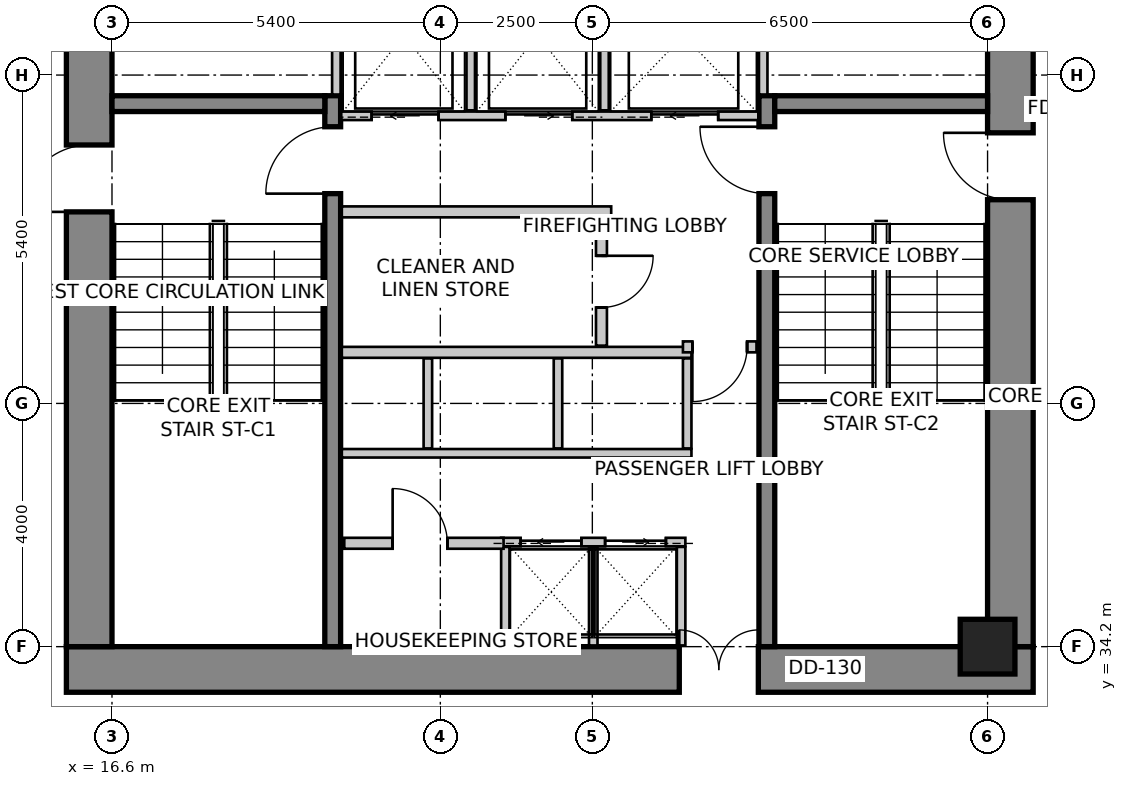
"""IFC4 building model, lengths in metres.
Left out: names, types, materials, properties, quantities, classifications, styles, units other than length and angle.
Written with IfcOpenShell. Run it as: python <this file> out.ifc"""

import sys

from ifc_helpers import new_model, si_unit, direction, frame, frame_2d, origin, origin_2d, place, context, subcontext, project, spatial, rectangle, extrude, source, transform, mapped, element, fill, save


model = new_model("IFC4")
c1 = context("Model", 3, precision=1e-05, world=origin(), true_north=direction((0.0, 1.0)))
c2 = subcontext(c1, "Body", "Model", "MODEL_VIEW")
j1 = project(units=[si_unit("LENGTHUNIT", "METRE"), si_unit("PLANEANGLEUNIT", "RADIAN")], contexts=[c1])
p1 = place(None, origin())
s1 = spatial("IfcSite", under=j1, at=p1, CompositionType="ELEMENT")
p2 = place(p1, origin())
s2 = spatial("IfcBuilding", under=s1, at=p2, CompositionType="ELEMENT")
p3 = place(p2, frame((0.0, 0.0, 132.2)))
s3 = spatial("IfcBuildingStorey", under=s2, at=p3, CompositionType="ELEMENT", Elevation=132.2)
p4 = place(p3, frame((15.85, 33.825, 0.0), z_axis=(0.0, 0.0, 1.0), x_axis=(1.0, 0.0, 0.0)))
e1 = element("IfcWall", 1, at=p4, inside=s3, PredefinedType="SHEAR", context=c2, shape_type="SweptSolid", body=[
    extrude(rectangle(XDim=15.9, YDim=0.75, at=frame_2d((7.95, 0.0))), origin(), (0.0, 0.0, 1.0), 3.6),
])
m1 = source(origin(), c2, "Body", "SweptSolid", [
    extrude(rectangle(XDim=1.3, YDim=2.15, at=frame_2d((0.65, 1.075))), frame((0.0, 0.385, 0.0), z_axis=(0.0, -1.0, 0.0), x_axis=(1.0, 0.0, 0.0)), (0.0, 0.0, 1.0), 0.77),
])
p5 = place(p4, frame((10.08, 0.0, 0.0)))
e2 = element("IfcOpeningElement", 2, at=p5, cuts=e1, PredefinedType="OPENING", context=c2, shape_type="MappedRepresentation", body=[
    mapped(m1, transform((0.0, 0.0, 0.0), scale=1.0)),
])
p6 = place(p3, frame((16.225, 34.2, 0.0), z_axis=(0.0, 0.0, 1.0), x_axis=(0.0, 1.0, 0.0)))
e3 = element("IfcWall", 3, at=p6, inside=s3, PredefinedType="SHEAR", context=c2, shape_type="SweptSolid", body=[
    extrude(rectangle(XDim=11.4, YDim=0.75, at=frame_2d((5.7, 0.0))), origin(), (0.0, 0.0, 1.0), 3.6),
])
m2 = source(origin(), c2, "Body", "SweptSolid", [
    extrude(rectangle(XDim=1.1, YDim=2.15, at=frame_2d((0.55, 1.075))), frame((0.0, 0.385, 0.0), z_axis=(0.0, -1.0, 0.0), x_axis=(1.0, 0.0, 0.0)), (0.0, 0.0, 1.0), 0.77),
])
p7 = place(p6, frame((7.15, 0.0, 0.0)))
e4 = element("IfcOpeningElement", 4, at=p7, cuts=e3, PredefinedType="OPENING", context=c2, shape_type="MappedRepresentation", body=[
    mapped(m2, transform((0.0, 0.0, 0.0), scale=1.0)),
])
p8 = place(p3, frame((31.375, 34.2, 0.0), z_axis=(0.0, 0.0, 1.0), x_axis=(0.0, 1.0, 0.0)))
e5 = element("IfcWall", 5, at=p8, inside=s3, PredefinedType="SHEAR", context=c2, shape_type="SweptSolid", body=[
    extrude(rectangle(XDim=11.4, YDim=0.75, at=frame_2d((5.7, 0.0))), origin(), (0.0, 0.0, 1.0), 3.6),
])
p9 = place(p8, frame((7.35, 0.0, 0.0)))
e6 = element("IfcOpeningElement", 6, at=p9, cuts=e5, PredefinedType="OPENING", context=c2, shape_type="MappedRepresentation", body=[
    mapped(m2, transform((0.0, 0.0, 0.0), scale=1.0)),
])
p10 = place(p3, frame((20.23, 34.2, 0.0), z_axis=(0.0, 0.0, 1.0), x_axis=(0.0, 1.0, 0.0)))
e7 = element("IfcWall", 7, at=p10, inside=s3, PredefinedType="SHEAR", context=c2, shape_type="SweptSolid", body=[
    extrude(rectangle(XDim=9.06, YDim=0.26, at=frame_2d((4.53, 0.0))), origin(), (0.0, 0.0, 1.0), 3.6),
])
m3 = source(origin(), c2, "Body", "SweptSolid", [
    extrude(rectangle(XDim=1.1, YDim=2.15, at=frame_2d((0.55, 1.075))), frame((0.0, 0.14, 0.0), z_axis=(0.0, -1.0, 0.0), x_axis=(1.0, 0.0, 0.0)), (0.0, 0.0, 1.0), 0.28),
])
p11 = place(p10, frame((7.45, 0.0, 0.0)))
e8 = element("IfcOpeningElement", 8, at=p11, cuts=e7, PredefinedType="OPENING", context=c2, shape_type="MappedRepresentation", body=[
    mapped(m3, transform((0.0, 0.0, 0.0), scale=1.0)),
])
p12 = place(p3, frame((27.37, 34.2, 0.0), z_axis=(0.0, 0.0, 1.0), x_axis=(0.0, 1.0, 0.0)))
e9 = element("IfcWall", 9, at=p12, inside=s3, PredefinedType="SHEAR", context=c2, shape_type="SweptSolid", body=[
    extrude(rectangle(XDim=9.06, YDim=0.26, at=frame_2d((4.53, 0.0))), origin(), (0.0, 0.0, 1.0), 3.6),
])
p13 = place(p12, frame((7.45, 0.0, 0.0)))
e10 = element("IfcOpeningElement", 10, at=p13, cuts=e9, PredefinedType="OPENING", context=c2, shape_type="MappedRepresentation", body=[
    mapped(m3, transform((0.0, 0.0, 0.0), scale=1.0)),
])
for number, where, z_axis, x_axis in (
    (11, (16.6, 43.13, 0.0), (0.0, 0.0, 1.0), (1.0, 0.0, 0.0)),
    (12, (27.5, 43.13, 0.0), (0.0, 0.0, 1.0), (1.0, 0.0, 0.0)),
):
    element("IfcWall", number, at=place(p3, frame(where, z_axis=z_axis, x_axis=x_axis)), inside=s3, PredefinedType="SHEAR", context=c2, shape_type="SweptSolid", body=[
        extrude(rectangle(XDim=3.5, YDim=0.26, at=frame_2d((1.75, 0.0))), origin(), (0.0, 0.0, 1.0), 3.6),
    ])
m4 = source(origin(), c2, "Body", "SweptSolid", [
    extrude(rectangle(XDim=0.9, YDim=0.9, at=origin_2d()), origin(), (0.0, 0.0, 1.0), 3.6),
])
p14 = place(p3, frame((31.0, 34.2, 0.0), z_axis=(0.0, 0.0, 1.0), x_axis=(1.0, 0.0, 0.0)))
e13 = element("IfcColumn", 13, at=p14, inside=s3, PredefinedType="COLUMN", context=c2, shape_type="MappedRepresentation", body=[
    mapped(m4, transform((0.0, 0.0, 0.0), scale=1.0)),
])
p15 = place(p3, frame((20.37, 42.93, 0.0), z_axis=(0.0, 0.0, 1.0), x_axis=(1.0, 0.0, 0.0)))
e14 = element("IfcWall", 14, at=p15, inside=s3, PredefinedType="SOLIDWALL", context=c2, shape_type="SweptSolid", body=[
    extrude(rectangle(XDim=6.86, YDim=0.14, at=frame_2d((3.43, 0.0))), origin(), (0.0, 0.0, 1.0), 3.35),
])
m5 = source(origin(), c2, "Body", "SweptSolid", [
    extrude(rectangle(XDim=1.1, YDim=2.15, at=frame_2d((0.55, 1.075))), frame((0.0, 0.08, 0.0), z_axis=(0.0, -1.0, 0.0), x_axis=(1.0, 0.0, 0.0)), (0.0, 0.0, 1.0), 0.16),
])
p16 = place(p15, frame((0.5, 0.0, 0.0)))
e15 = element("IfcOpeningElement", 15, at=p16, cuts=e14, PredefinedType="OPENING", context=c2, shape_type="MappedRepresentation", body=[
    mapped(m5, transform((0.0, 0.0, 0.0), scale=1.0)),
])
p17 = place(p15, frame((2.7, 0.0, 0.0)))
e16 = element("IfcOpeningElement", 16, at=p17, cuts=e14, PredefinedType="OPENING", context=c2, shape_type="MappedRepresentation", body=[
    mapped(m5, transform((0.0, 0.0, 0.0), scale=1.0)),
])
p18 = place(p15, frame((5.1, 0.0, 0.0)))
e17 = element("IfcOpeningElement", 17, at=p18, cuts=e14, PredefinedType="OPENING", context=c2, shape_type="MappedRepresentation", body=[
    mapped(m5, transform((0.0, 0.0, 0.0), scale=1.0)),
])
for number, where, z_axis, x_axis in (
    (18, (20.29, 43.28, 0.0), (0.0, 0.0, 1.0), (0.0, 1.0, 0.0)),
    (19, (27.31, 43.28, 0.0), (0.0, 0.0, 1.0), (0.0, 1.0, 0.0)),
):
    element("IfcWall", number, at=place(p3, frame(where, z_axis=z_axis, x_axis=x_axis)), inside=s3, PredefinedType="SOLIDWALL", context=c2, shape_type="SweptSolid", body=[
        extrude(rectangle(XDim=2.3, YDim=0.14, at=frame_2d((1.15, 0.0))), origin(), (0.0, 0.0, 1.0), 3.35),
    ])
for number, where, z_axis, x_axis in (
    (20, (22.5, 43.02, 0.0), (0.0, 0.0, 1.0), (0.0, 1.0, 0.0)),
    (21, (24.7, 43.02, 0.0), (0.0, 0.0, 1.0), (0.0, 1.0, 0.0)),
):
    element("IfcWall", number, at=place(p3, frame(where, z_axis=z_axis, x_axis=x_axis)), inside=s3, PredefinedType="SOLIDWALL", context=c2, shape_type="SweptSolid", body=[
        extrude(rectangle(XDim=2.56, YDim=0.14, at=frame_2d((1.28, 0.0))), origin(), (0.0, 0.0, 1.0), 3.35),
    ])
p19 = place(p3, frame((23.0, 35.92, 0.0), z_axis=(0.0, 0.0, 1.0), x_axis=(1.0, 0.0, 0.0)))
e22 = element("IfcWall", 22, at=p19, inside=s3, PredefinedType="SOLIDWALL", context=c2, shape_type="SweptSolid", body=[
    extrude(rectangle(XDim=3.03, YDim=0.14, at=frame_2d((1.515, 0.0))), origin(), (0.0, 0.0, 1.0), 3.35),
])
m6 = source(origin(), c2, "Body", "SweptSolid", [
    extrude(rectangle(XDim=1.0, YDim=2.15, at=frame_2d((0.5, 1.075))), frame((0.0, 0.08, 0.0), z_axis=(0.0, -1.0, 0.0), x_axis=(1.0, 0.0, 0.0)), (0.0, 0.0, 1.0), 0.16),
])
p20 = place(p19, frame((0.32, 0.0, 0.0)))
e23 = element("IfcOpeningElement", 23, at=p20, cuts=e22, PredefinedType="OPENING", context=c2, shape_type="MappedRepresentation", body=[
    mapped(m6, transform((0.0, 0.0, 0.0), scale=1.0)),
])
p21 = place(p19, frame((1.71, 0.0, 0.0)))
e24 = element("IfcOpeningElement", 24, at=p21, cuts=e22, PredefinedType="OPENING", context=c2, shape_type="MappedRepresentation", body=[
    mapped(m6, transform((0.0, 0.0, 0.0), scale=1.0)),
])
for number, where, z_axis, x_axis in (
    (25, (25.96, 34.22, 0.0), (0.0, 0.0, 1.0), (0.0, 1.0, 0.0)),
    (26, (23.07, 34.22, 0.0), (0.0, 0.0, 1.0), (0.0, 1.0, 0.0)),
    (27, (24.515, 34.22, 0.0), (0.0, 0.0, 1.0), (0.0, 1.0, 0.0)),
):
    element("IfcWall", number, at=place(p3, frame(where, z_axis=z_axis, x_axis=x_axis)), inside=s3, PredefinedType="SOLIDWALL", context=c2, shape_type="SweptSolid", body=[
        extrude(rectangle(XDim=1.62, YDim=0.14, at=frame_2d((0.81, 0.0))), origin(), (0.0, 0.0, 1.0), 2.642),
    ])
p22 = place(p3, frame((20.38, 37.38, 0.0), z_axis=(0.0, 0.0, 1.0), x_axis=(1.0, 0.0, 0.0)))
e28 = element("IfcWall", 28, at=p22, inside=s3, PredefinedType="SOLIDWALL", context=c2, shape_type="SweptSolid", body=[
    extrude(rectangle(XDim=5.75, YDim=0.14, at=frame_2d((2.875, 0.0))), origin(), (0.0, 0.0, 1.0), 3.35),
])
p23 = place(p3, frame((20.38, 39.04, 0.0), z_axis=(0.0, 0.0, 1.0), x_axis=(1.0, 0.0, 0.0)))
e29 = element("IfcWall", 29, at=p23, inside=s3, PredefinedType="SOLIDWALL", context=c2, shape_type="SweptSolid", body=[
    extrude(rectangle(XDim=5.75, YDim=0.18, at=frame_2d((2.875, 0.0))), origin(), (0.0, 0.0, 1.0), 3.35),
])
for number, where, z_axis, x_axis in (
    (30, (26.06, 37.46, 0.0), (0.0, 0.0, 1.0), (0.0, 1.0, 0.0)),
    (31, (21.795, 37.46, 0.0), (0.0, 0.0, 1.0), (0.0, 1.0, 0.0)),
    (32, (23.935, 37.46, 0.0), (0.0, 0.0, 1.0), (0.0, 1.0, 0.0)),
):
    element("IfcWall", number, at=place(p3, frame(where, z_axis=z_axis, x_axis=x_axis)), inside=s3, PredefinedType="SOLIDWALL", context=c2, shape_type="SweptSolid", body=[
        extrude(rectangle(XDim=1.48, YDim=0.14, at=frame_2d((0.74, 0.0))), origin(), (0.0, 0.0, 1.0), 3.35),
    ])
p24 = place(p3, frame((24.81, 41.35, 0.0), z_axis=(0.0, 0.0, 1.0), x_axis=(-1.0, 0.0, 0.0)))
e33 = element("IfcWall", 33, at=p24, inside=s3, PredefinedType="PARTITIONING", context=c2, shape_type="SweptSolid", body=[
    extrude(rectangle(XDim=4.43, YDim=0.18, at=frame_2d((2.215, 0.0))), origin(), (0.0, 0.0, 1.0), 3.35),
])
p25 = place(p3, frame((24.65, 41.256, 0.0), z_axis=(0.0, 0.0, 1.0), x_axis=(0.0, -1.0, 0.0)))
e34 = element("IfcWall", 34, at=p25, inside=s3, PredefinedType="PARTITIONING", context=c2, shape_type="SweptSolid", body=[
    extrude(rectangle(XDim=2.106, YDim=0.18, at=frame_2d((1.053, 0.0))), origin(), (0.0, 0.0, 1.0), 3.35),
])
m7 = source(origin(), c2, "Body", "SweptSolid", [
    extrude(rectangle(XDim=0.85, YDim=2.15, at=frame_2d((0.425, 1.075))), frame((0.0, 0.1, 0.0), z_axis=(0.0, -1.0, 0.0), x_axis=(1.0, 0.0, 0.0)), (0.0, 0.0, 1.0), 0.2),
])
p26 = place(p25, frame((0.628, 0.0, 0.0)))
e35 = element("IfcOpeningElement", 35, at=p26, cuts=e34, PredefinedType="OPENING", context=c2, shape_type="MappedRepresentation", body=[
    mapped(m7, transform((0.0, 0.0, 0.0), scale=1.0)),
])
p27 = place(p3, frame((27.2, 39.13, 0.0), z_axis=(0.0, 0.0, 1.0), x_axis=(-1.0, 0.0, 0.0)))
e36 = element("IfcWall", 36, at=p27, inside=s3, PredefinedType="PARTITIONING", context=c2, shape_type="SweptSolid", body=[
    extrude(rectangle(XDim=1.21, YDim=0.18, at=frame_2d((0.605, 0.0))), origin(), (0.0, 0.0, 1.0), 3.35),
])
m8 = source(origin(), c2, "Body", "SweptSolid", [
    extrude(rectangle(XDim=0.9, YDim=2.15, at=frame_2d((0.45, 1.075))), frame((0.0, 0.1, 0.0), z_axis=(0.0, -1.0, 0.0), x_axis=(1.0, 0.0, 0.0)), (0.0, 0.0, 1.0), 0.2),
])
p28 = place(p27, frame((0.155, 0.0, 0.0)))
e37 = element("IfcOpeningElement", 37, at=p28, cuts=e36, PredefinedType="OPENING", context=c2, shape_type="MappedRepresentation", body=[
    mapped(m8, transform((0.0, 0.0, 0.0), scale=1.0)),
])
p29 = place(p3, frame((20.42, 35.9, 0.0), z_axis=(0.0, 0.0, 1.0), x_axis=(1.0, 0.0, 0.0)))
e38 = element("IfcWall", 38, at=p29, inside=s3, PredefinedType="PARTITIONING", context=c2, shape_type="SweptSolid", body=[
    extrude(rectangle(XDim=2.62, YDim=0.18, at=frame_2d((1.31, 0.0))), origin(), (0.0, 0.0, 1.0), 3.35),
])
p30 = place(p29, frame((0.796, 0.0, 0.0)))
e39 = element("IfcOpeningElement", 39, at=p30, cuts=e38, PredefinedType="OPENING", context=c2, shape_type="MappedRepresentation", body=[
    mapped(m8, transform((0.0, 0.0, 0.0), scale=1.0)),
])
m9 = source(origin(), c2, "Body", "SweptSolid", [
    extrude(rectangle(XDim=1.1, YDim=2.15, at=frame_2d((0.55, 1.075))), frame((0.0, 0.025, 0.0), z_axis=(0.0, -1.0, 0.0), x_axis=(1.0, 0.0, 0.0)), (0.0, 0.0, 1.0), 0.05),
])
p31 = place(p16, origin())
e40 = element("IfcDoor", 40, at=p31, inside=s3, OperationType="SLIDING_TO_LEFT", PredefinedType="DOOR", context=c2, shape_type="MappedRepresentation", body=[
    mapped(m9, transform((0.0, 0.0, 0.0), scale=1.0)),
])
fill(e15, e40)
p32 = place(p17, origin())
e41 = element("IfcDoor", 41, at=p32, inside=s3, OperationType="SLIDING_TO_RIGHT", PredefinedType="DOOR", context=c2, shape_type="MappedRepresentation", body=[
    mapped(m9, transform((0.0, 0.0, 0.0), scale=1.0)),
])
fill(e16, e41)
m10 = source(origin(), c2, "Body", "SweptSolid", [
    extrude(rectangle(XDim=1.1, YDim=2.15, at=frame_2d((0.55, 1.075))), frame((0.0, 0.025, 0.0), z_axis=(0.0, -1.0, 0.0), x_axis=(1.0, 0.0, 0.0)), (0.0, 0.0, 1.0), 0.05),
])
p33 = place(p18, origin())
e42 = element("IfcDoor", 42, at=p33, inside=s3, OperationType="SLIDING_TO_LEFT", PredefinedType="DOOR", context=c2, shape_type="MappedRepresentation", body=[
    mapped(m10, transform((0.0, 0.0, 0.0), scale=1.0)),
])
fill(e17, e42)
m11 = source(origin(), c2, "Body", "SweptSolid", [
    extrude(rectangle(XDim=1.0, YDim=2.15, at=frame_2d((0.5, 1.075))), frame((0.0, 0.025, 0.0), z_axis=(0.0, -1.0, 0.0), x_axis=(1.0, 0.0, 0.0)), (0.0, 0.0, 1.0), 0.05),
])
p34 = place(p20, origin())
e43 = element("IfcDoor", 43, at=p34, inside=s3, OperationType="SLIDING_TO_LEFT", PredefinedType="DOOR", context=c2, shape_type="MappedRepresentation", body=[
    mapped(m11, transform((0.0, 0.0, 0.0), scale=1.0)),
])
fill(e23, e43)
p35 = place(p21, origin())
e44 = element("IfcDoor", 44, at=p35, inside=s3, OperationType="SLIDING_TO_RIGHT", PredefinedType="DOOR", context=c2, shape_type="MappedRepresentation", body=[
    mapped(m11, transform((0.0, 0.0, 0.0), scale=1.0)),
])
fill(e24, e44)
m12 = source(origin(), c2, "Body", "SweptSolid", [
    extrude(rectangle(XDim=1.1, YDim=2.15, at=frame_2d((0.55, 1.075))), frame((0.0, 0.025, 0.0), z_axis=(0.0, -1.0, 0.0), x_axis=(1.0, 0.0, 0.0)), (0.0, 0.0, 1.0), 0.05),
])
p36 = place(p11, origin())
e45 = element("IfcDoor", 45, at=p36, inside=s3, OperationType="SINGLE_SWING_LEFT", PredefinedType="DOOR", context=c2, shape_type="MappedRepresentation", body=[
    mapped(m12, transform((0.0, 0.0, 0.0), scale=1.0)),
])
fill(e8, e45)
p37 = place(p13, origin())
e46 = element("IfcDoor", 46, at=p37, inside=s3, OperationType="SINGLE_SWING_RIGHT", PredefinedType="DOOR", context=c2, shape_type="MappedRepresentation", body=[
    mapped(m12, transform((0.0, 0.0, 0.0), scale=1.0)),
])
fill(e10, e46)
p38 = place(p7, origin())
e47 = element("IfcDoor", 47, at=p38, inside=s3, OperationType="SINGLE_SWING_LEFT", PredefinedType="DOOR", context=c2, shape_type="MappedRepresentation", body=[
    mapped(m12, transform((0.0, 0.0, 0.0), scale=1.0)),
])
fill(e4, e47)
p39 = place(p9, origin())
e48 = element("IfcDoor", 48, at=p39, inside=s3, OperationType="SINGLE_SWING_RIGHT", PredefinedType="DOOR", context=c2, shape_type="MappedRepresentation", body=[
    mapped(m12, transform((0.0, 0.0, 0.0), scale=1.0)),
])
fill(e6, e48)
m13 = source(origin(), c2, "Body", "SweptSolid", [
    extrude(rectangle(XDim=1.3, YDim=2.15, at=frame_2d((0.65, 1.075))), frame((0.0, 0.025, 0.0), z_axis=(0.0, -1.0, 0.0), x_axis=(1.0, 0.0, 0.0)), (0.0, 0.0, 1.0), 0.05),
])
p40 = place(p5, origin())
e49 = element("IfcDoor", 49, at=p40, inside=s3, OperationType="DOUBLE_DOOR_SINGLE_SWING", PredefinedType="DOOR", context=c2, shape_type="MappedRepresentation", body=[
    mapped(m13, transform((0.0, 0.0, 0.0), scale=1.0)),
])
fill(e2, e49)
m14 = source(origin(), c2, "Body", "SweptSolid", [
    extrude(rectangle(XDim=0.85, YDim=2.15, at=frame_2d((0.425, 1.075))), frame((0.0, 0.025, 0.0), z_axis=(0.0, -1.0, 0.0), x_axis=(1.0, 0.0, 0.0)), (0.0, 0.0, 1.0), 0.05),
])
p41 = place(p26, origin())
e50 = element("IfcDoor", 50, at=p41, inside=s3, OperationType="SINGLE_SWING_LEFT", PredefinedType="DOOR", context=c2, shape_type="MappedRepresentation", body=[
    mapped(m14, transform((0.0, 0.0, 0.0), scale=1.0)),
])
fill(e35, e50)
m15 = source(origin(), c2, "Body", "SweptSolid", [
    extrude(rectangle(XDim=0.9, YDim=2.15, at=frame_2d((0.45, 1.075))), frame((0.0, 0.025, 0.0), z_axis=(0.0, -1.0, 0.0), x_axis=(1.0, 0.0, 0.0)), (0.0, 0.0, 1.0), 0.05),
])
p42 = place(p28, origin())
e51 = element("IfcDoor", 51, at=p42, inside=s3, OperationType="SINGLE_SWING_RIGHT", PredefinedType="DOOR", context=c2, shape_type="MappedRepresentation", body=[
    mapped(m15, transform((0.0, 0.0, 0.0), scale=1.0)),
])
fill(e37, e51)
p43 = place(p30, origin())
e52 = element("IfcDoor", 52, at=p43, inside=s3, OperationType="SINGLE_SWING_LEFT", PredefinedType="DOOR", context=c2, shape_type="MappedRepresentation", body=[
    mapped(m15, transform((0.0, 0.0, 0.0), scale=1.0)),
])
fill(e39, e52)
save(model, sys.argv[1])
